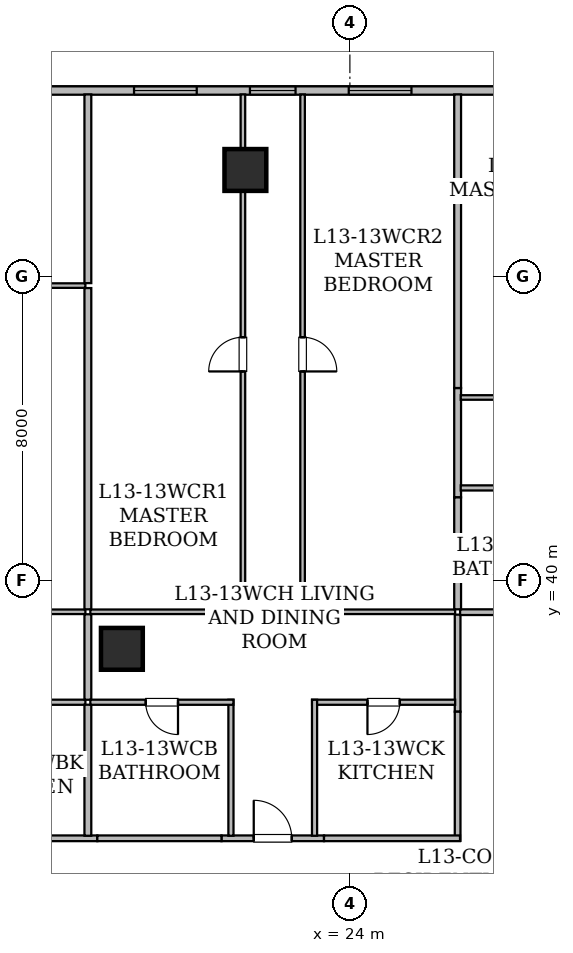
"""IFC4 building model, lengths in metres.
Left out: names, types, materials, properties, quantities, classifications, styles, units other than length and angle.
Written with IfcOpenShell. Run it as: python <this file> out.ifc"""

import sys

from ifc_helpers import new_model, si_unit, direction, frame, frame_2d, origin, origin_2d, place, context, subcontext, project, spatial, rectangle, hollow_rectangle, extrude, element, fill, save


model = new_model("IFC4")
c1 = context("Model", 3, precision=1e-05, world=origin(), true_north=direction((0.0, 1.0)))
c2 = subcontext(c1, "Body", "Model", "MODEL_VIEW")
j1 = project(units=[si_unit("LENGTHUNIT", "METRE"), si_unit("PLANEANGLEUNIT", "RADIAN")], contexts=[c1])
p1 = place(None, origin())
s1 = spatial("IfcSite", under=j1, at=p1, CompositionType="ELEMENT")
p2 = place(p1, origin())
s2 = spatial("IfcBuilding", under=s1, at=p2, CompositionType="ELEMENT")
p3 = place(p2, frame((0.0, 0.0, 55.2)))
s3 = spatial("IfcBuildingStorey", under=s2, at=p3, CompositionType="ELEMENT", Elevation=55.2)
for number, where, z_axis, x_axis in (
    (1, (21.25, 50.8, 0.0), (0.0, 0.0, 1.0), (1.0, 0.0, 0.0)),
    (2, (18.0, 38.2, 0.0), (0.0, 0.0, 1.0), (1.0, 0.0, 0.0)),
):
    element("IfcColumn", number, at=place(p3, frame(where, z_axis=z_axis, x_axis=x_axis)), inside=s3, PredefinedType="COLUMN", context=c2, shape_type="SweptSolid", body=[
        extrude(hollow_rectangle(XDim=1.1, YDim=1.1, WallThickness=0.055, at=origin_2d()), origin(), (0.0, 0.0, 1.0), 3.65),
    ])
p4 = place(p3, frame((8.315, 52.89, 0.0), z_axis=(0.0, 0.0, 1.0), x_axis=(1.0, 0.0, 0.0)))
e3 = element("IfcWall", 3, at=p4, inside=s3, PredefinedType="STANDARD", context=c2, shape_type="SweptSolid", body=[
    extrude(rectangle(XDim=37.439, YDim=0.22, at=frame_2d((18.719, 0.0))), origin(), (0.0, 0.0, 1.0), 3.43),
])
p5 = place(p4, frame((5.093, 0.0, 0.85)))
e4 = element("IfcOpeningElement", 4, at=p5, cuts=e3, PredefinedType="OPENING", context=c2, shape_type="SweptSolid", body=[
    extrude(rectangle(XDim=1.65, YDim=1.55, at=frame_2d((0.825, 0.775))), frame((0.0, 0.12, 0.0), z_axis=(0.0, -1.0, 0.0), x_axis=(1.0, 0.0, 0.0)), (0.0, 0.0, 1.0), 0.24),
])
p6 = place(p4, frame((13.055, 0.0, 0.8)))
e5 = element("IfcOpeningElement", 5, at=p6, cuts=e3, PredefinedType="OPENING", context=c2, shape_type="SweptSolid", body=[
    extrude(rectangle(XDim=1.2, YDim=1.5, at=frame_2d((0.6, 0.75))), frame((0.0, 0.12, 0.0), z_axis=(0.0, -1.0, 0.0), x_axis=(1.0, 0.0, 0.0)), (0.0, 0.0, 1.0), 0.24),
])
p7 = place(p4, frame((10.005, 0.0, 0.85)))
e6 = element("IfcOpeningElement", 6, at=p7, cuts=e3, PredefinedType="OPENING", context=c2, shape_type="SweptSolid", body=[
    extrude(rectangle(XDim=1.65, YDim=1.55, at=frame_2d((0.825, 0.775))), frame((0.0, 0.12, 0.0), z_axis=(0.0, -1.0, 0.0), x_axis=(1.0, 0.0, 0.0)), (0.0, 0.0, 1.0), 0.24),
])
p8 = place(p4, frame((15.655, 0.0, 0.85)))
e7 = element("IfcOpeningElement", 7, at=p8, cuts=e3, PredefinedType="OPENING", context=c2, shape_type="SweptSolid", body=[
    extrude(rectangle(XDim=1.65, YDim=1.55, at=frame_2d((0.825, 0.775))), frame((0.0, 0.12, 0.0), z_axis=(0.0, -1.0, 0.0), x_axis=(1.0, 0.0, 0.0)), (0.0, 0.0, 1.0), 0.24),
])
p9 = place(p4, frame((25.185, 0.0, 0.8)))
e8 = element("IfcOpeningElement", 8, at=p9, cuts=e3, PredefinedType="OPENING", context=c2, shape_type="SweptSolid", body=[
    extrude(rectangle(XDim=1.2, YDim=1.5, at=frame_2d((0.6, 0.75))), frame((0.0, 0.12, 0.0), z_axis=(0.0, -1.0, 0.0), x_axis=(1.0, 0.0, 0.0)), (0.0, 0.0, 1.0), 0.24),
])
p10 = place(p4, frame((20.935, 0.0, 0.85)))
e9 = element("IfcOpeningElement", 9, at=p10, cuts=e3, PredefinedType="OPENING", context=c2, shape_type="SweptSolid", body=[
    extrude(rectangle(XDim=1.65, YDim=1.55, at=frame_2d((0.825, 0.775))), frame((0.0, 0.12, 0.0), z_axis=(0.0, -1.0, 0.0), x_axis=(1.0, 0.0, 0.0)), (0.0, 0.0, 1.0), 0.24),
])
p11 = place(p4, frame((28.985, 0.0, 0.85)))
e10 = element("IfcOpeningElement", 10, at=p11, cuts=e3, PredefinedType="OPENING", context=c2, shape_type="SweptSolid", body=[
    extrude(rectangle(XDim=1.65, YDim=1.55, at=frame_2d((0.825, 0.775))), frame((0.0, 0.12, 0.0), z_axis=(0.0, -1.0, 0.0), x_axis=(1.0, 0.0, 0.0)), (0.0, 0.0, 1.0), 0.24),
])
p12 = place(p4, frame((33.49, 0.0, 0.85)))
e11 = element("IfcOpeningElement", 11, at=p12, cuts=e3, PredefinedType="OPENING", context=c2, shape_type="SweptSolid", body=[
    extrude(rectangle(XDim=1.65, YDim=1.55, at=frame_2d((0.825, 0.775))), frame((0.0, 0.12, 0.0), z_axis=(0.0, -1.0, 0.0), x_axis=(1.0, 0.0, 0.0)), (0.0, 0.0, 1.0), 0.24),
])
p13 = place(p4, frame((35.942, 0.0, 0.85)))
e12 = element("IfcOpeningElement", 12, at=p13, cuts=e3, PredefinedType="OPENING", context=c2, shape_type="SweptSolid", body=[
    extrude(rectangle(XDim=1.35, YDim=1.5, at=frame_2d((0.675, 0.75))), frame((0.0, 0.12, 0.0), z_axis=(0.0, -1.0, 0.0), x_axis=(1.0, 0.0, 0.0)), (0.0, 0.0, 1.0), 0.24),
])
p14 = place(p3, frame((11.924, 33.215, 0.0), z_axis=(0.0, 0.0, 1.0), x_axis=(1.0, 0.0, 0.0)))
e13 = element("IfcWall", 13, at=p14, inside=s3, PredefinedType="STANDARD", context=c2, shape_type="SweptSolid", body=[
    extrude(rectangle(XDim=5.43, YDim=0.15, at=frame_2d((2.715, 0.0))), origin(), (0.0, 0.0, 1.0), 3.43),
])
p15 = place(p3, frame((26.835, 36.546, 0.0), z_axis=(0.0, 0.0, 1.0), x_axis=(0.0, 1.0, 0.0)))
e14 = element("IfcWall", 14, at=p15, inside=s3, PredefinedType="STANDARD", context=c2, shape_type="SweptSolid", body=[
    extrude(rectangle(XDim=2.554, YDim=0.15, at=frame_2d((1.277, 0.0))), origin(), (0.0, 0.0, 1.0), 2.647),
])
p16 = place(p3, frame((20.621, 33.215, 0.0), z_axis=(0.0, 0.0, 1.0), x_axis=(1.0, 0.0, 0.0)))
e15 = element("IfcWall", 15, at=p16, inside=s3, PredefinedType="STANDARD", context=c2, shape_type="SweptSolid", body=[
    extrude(rectangle(XDim=2.698, YDim=0.15, at=frame_2d((1.349, 0.0))), origin(), (0.0, 0.0, 1.0), 3.43),
])
p17 = place(p16, frame((0.849, 0.0, 0.0)))
e16 = element("IfcOpeningElement", 16, at=p17, cuts=e15, PredefinedType="OPENING", context=c2, shape_type="SweptSolid", body=[
    extrude(rectangle(XDim=1.0, YDim=2.15, at=frame_2d((0.5, 1.075))), frame((0.0, 0.085, 0.0), z_axis=(0.0, -1.0, 0.0), x_axis=(1.0, 0.0, 0.0)), (0.0, 0.0, 1.0), 0.17),
])
p18 = place(p3, frame((17.354, 33.215, 0.0), z_axis=(0.0, 0.0, 1.0), x_axis=(1.0, 0.0, 0.0)))
e17 = element("IfcWall", 17, at=p18, inside=s3, PredefinedType="STANDARD", context=c2, shape_type="SweptSolid", body=[
    extrude(rectangle(XDim=3.267, YDim=0.15, at=frame_2d((1.634, 0.0))), origin(), (0.0, 0.0, 1.0), 2.647),
])
p19 = place(p3, frame((26.835, 33.15, 0.0), z_axis=(0.0, 0.0, 1.0), x_axis=(0.0, 1.0, 0.0)))
e18 = element("IfcWall", 18, at=p19, inside=s3, PredefinedType="STANDARD", context=c2, shape_type="SweptSolid", body=[
    extrude(rectangle(XDim=3.396, YDim=0.15, at=frame_2d((1.698, 0.0))), origin(), (0.0, 0.0, 1.0), 3.43),
])
p20 = place(p3, frame((23.319, 33.215, 0.0), z_axis=(0.0, 0.0, 1.0), x_axis=(1.0, 0.0, 0.0)))
e19 = element("IfcWall", 19, at=p20, inside=s3, PredefinedType="STANDARD", context=c2, shape_type="SweptSolid", body=[
    extrude(rectangle(XDim=3.579, YDim=0.15, at=frame_2d((1.79, 0.0))), origin(), (0.0, 0.0, 1.0), 3.43),
])
p21 = place(p3, frame((26.9, 39.165, 0.0), z_axis=(0.0, 0.0, 1.0), x_axis=(1.0, 0.0, 0.0)))
e20 = element("IfcWall", 20, at=p21, inside=s3, PredefinedType="STANDARD", context=c2, shape_type="SweptSolid", body=[
    extrude(rectangle(XDim=4.701, YDim=0.15, at=frame_2d((2.351, 0.0))), origin(), (0.0, 0.0, 1.0), 2.647),
])
p22 = place(p3, frame((17.04, 36.795, 0.0), z_axis=(0.0, 0.0, 1.0), x_axis=(-1.0, 0.0, 0.0)))
e21 = element("IfcWall", 21, at=p22, inside=s3, PredefinedType="PARTITIONING", context=c2, shape_type="SweptSolid", body=[
    extrude(rectangle(XDim=5.43, YDim=0.135, at=frame_2d((2.715, 0.0))), origin(), (0.0, 0.0, 1.0), 3.43),
])
p23 = place(p22, frame((2.29, 0.0, 0.0)))
e22 = element("IfcOpeningElement", 22, at=p23, cuts=e21, PredefinedType="OPENING", context=c2, shape_type="SweptSolid", body=[
    extrude(rectangle(XDim=0.85, YDim=2.1, at=frame_2d((0.425, 1.05))), frame((0.0, 0.077, 0.0), z_axis=(0.0, -1.0, 0.0), x_axis=(1.0, 0.0, 0.0)), (0.0, 0.0, 1.0), 0.155),
])
p24 = place(p3, frame((11.295, 39.175, 0.0), z_axis=(0.0, 0.0, 1.0), x_axis=(1.0, 0.0, 0.0)))
e23 = element("IfcWall", 23, at=p24, inside=s3, PredefinedType="PARTITIONING", context=c2, shape_type="SweptSolid", body=[
    extrude(rectangle(XDim=5.745, YDim=0.12, at=frame_2d((2.873, 0.0))), origin(), (0.0, 0.0, 1.0), 3.43),
])
p25 = place(p3, frame((17.105, 39.11, 0.0), z_axis=(0.0, 0.0, 1.0), x_axis=(0.0, -1.0, 0.0)))
e24 = element("IfcWall", 24, at=p25, inside=s3, PredefinedType="STANDARD", context=c2, shape_type="SweptSolid", body=[
    extrude(rectangle(XDim=2.25, YDim=0.18, at=frame_2d((1.125, 0.0))), origin(), (0.0, 0.0, 1.0), 2.647),
])
p26 = place(p3, frame((17.105, 36.73, 0.0), z_axis=(0.0, 0.0, 1.0), x_axis=(0.0, -1.0, 0.0)))
e25 = element("IfcWall", 25, at=p26, inside=s3, PredefinedType="STANDARD", context=c2, shape_type="SweptSolid", body=[
    extrude(rectangle(XDim=3.448, YDim=0.18, at=frame_2d((1.724, 0.0))), origin(), (0.0, 0.0, 1.0), 3.43),
])
p27 = place(p3, frame((11.414, 47.758, 0.0), z_axis=(0.0, 0.0, 1.0), x_axis=(1.0, 0.0, 0.0)))
e26 = element("IfcWall", 26, at=p27, inside=s3, PredefinedType="PARTITIONING", context=c2, shape_type="SweptSolid", body=[
    extrude(rectangle(XDim=5.626, YDim=0.12, at=frame_2d((2.813, 0.0))), origin(), (0.0, 0.0, 1.0), 2.647),
])
p28 = place(p3, frame((17.105, 47.693, 0.0), z_axis=(0.0, 0.0, 1.0), x_axis=(0.0, -1.0, 0.0)))
e27 = element("IfcWall", 27, at=p28, inside=s3, PredefinedType="STANDARD", context=c2, shape_type="SweptSolid", body=[
    extrude(rectangle(XDim=8.453, YDim=0.18, at=frame_2d((4.227, 0.0))), origin(), (0.0, 0.0, 1.0), 2.647),
])
p29 = place(p3, frame((17.105, 52.788, 0.0), z_axis=(0.0, 0.0, 1.0), x_axis=(0.0, -1.0, 0.0)))
e28 = element("IfcWall", 28, at=p29, inside=s3, PredefinedType="STANDARD", context=c2, shape_type="SweptSolid", body=[
    extrude(rectangle(XDim=4.965, YDim=0.18, at=frame_2d((2.482, 0.0))), origin(), (0.0, 0.0, 1.0), 2.803),
])
p30 = place(p3, frame((20.87, 33.282, 0.0), z_axis=(0.0, 0.0, 1.0), x_axis=(0.0, 1.0, 0.0)))
e29 = element("IfcWall", 29, at=p30, inside=s3, PredefinedType="PARTITIONING", context=c2, shape_type="SweptSolid", body=[
    extrude(rectangle(XDim=3.578, YDim=0.135, at=frame_2d((1.789, 0.0))), origin(), (0.0, 0.0, 1.0), 3.43),
])
p31 = place(p3, frame((20.935, 36.795, 0.0), z_axis=(0.0, 0.0, 1.0), x_axis=(-1.0, 0.0, 0.0)))
e30 = element("IfcWall", 30, at=p31, inside=s3, PredefinedType="PARTITIONING", context=c2, shape_type="SweptSolid", body=[
    extrude(rectangle(XDim=3.765, YDim=0.135, at=frame_2d((1.883, 0.0))), origin(), (0.0, 0.0, 1.0), 2.647),
])
p32 = place(p31, frame((1.458, 0.0, 0.0)))
e31 = element("IfcOpeningElement", 31, at=p32, cuts=e30, PredefinedType="OPENING", context=c2, shape_type="SweptSolid", body=[
    extrude(rectangle(XDim=0.85, YDim=2.1, at=frame_2d((0.425, 1.05))), frame((0.0, 0.077, 0.0), z_axis=(0.0, -1.0, 0.0), x_axis=(1.0, 0.0, 0.0)), (0.0, 0.0, 1.0), 0.155),
])
p33 = place(p3, frame((26.77, 36.795, 0.0), z_axis=(0.0, 0.0, 1.0), x_axis=(-1.0, 0.0, 0.0)))
e32 = element("IfcWall", 32, at=p33, inside=s3, PredefinedType="PARTITIONING", context=c2, shape_type="SweptSolid", body=[
    extrude(rectangle(XDim=3.765, YDim=0.135, at=frame_2d((1.883, 0.0))), origin(), (0.0, 0.0, 1.0), 3.43),
])
p34 = place(p33, frame((1.458, 0.0, 0.0)))
e33 = element("IfcOpeningElement", 33, at=p34, cuts=e32, PredefinedType="OPENING", context=c2, shape_type="SweptSolid", body=[
    extrude(rectangle(XDim=0.85, YDim=2.1, at=frame_2d((0.425, 1.05))), frame((0.0, 0.077, 0.0), z_axis=(0.0, -1.0, 0.0), x_axis=(1.0, 0.0, 0.0)), (0.0, 0.0, 1.0), 0.155),
])
p35 = place(p3, frame((23.07, 36.86, 0.0), z_axis=(0.0, 0.0, 1.0), x_axis=(0.0, -1.0, 0.0)))
e34 = element("IfcWall", 34, at=p35, inside=s3, PredefinedType="PARTITIONING", context=c2, shape_type="SweptSolid", body=[
    extrude(rectangle(XDim=3.578, YDim=0.135, at=frame_2d((1.789, 0.0))), origin(), (0.0, 0.0, 1.0), 3.43),
])
p36 = place(p3, frame((17.17, 39.175, 0.0), z_axis=(0.0, 0.0, 1.0), x_axis=(1.0, 0.0, 0.0)))
e35 = element("IfcWall", 35, at=p36, inside=s3, PredefinedType="PARTITIONING", context=c2, shape_type="SweptSolid", body=[
    extrude(rectangle(XDim=4.08, YDim=0.12, at=frame_2d((2.04, 0.0))), origin(), (0.0, 0.0, 1.0), 2.647),
])
p37 = place(p3, frame((21.185, 39.11, 0.0), z_axis=(0.0, 0.0, 1.0), x_axis=(0.0, 1.0, 0.0)))
e36 = element("IfcWall", 36, at=p37, inside=s3, PredefinedType="PARTITIONING", context=c2, shape_type="SweptSolid", body=[
    extrude(rectangle(XDim=13.678, YDim=0.12, at=frame_2d((6.839, 0.0))), origin(), (0.0, 0.0, 1.0), 2.647),
])
p38 = place(p37, frame((6.389, 0.0, 0.0)))
e37 = element("IfcOpeningElement", 37, at=p38, cuts=e36, PredefinedType="OPENING", context=c2, shape_type="SweptSolid", body=[
    extrude(rectangle(XDim=0.9, YDim=2.1, at=frame_2d((0.45, 1.05))), frame((0.0, 0.07, 0.0), z_axis=(0.0, -1.0, 0.0), x_axis=(1.0, 0.0, 0.0)), (0.0, 0.0, 1.0), 0.14),
])
p39 = place(p3, frame((22.755, 52.788, 0.0), z_axis=(0.0, 0.0, 1.0), x_axis=(0.0, -1.0, 0.0)))
e38 = element("IfcWall", 38, at=p39, inside=s3, PredefinedType="PARTITIONING", context=c2, shape_type="SweptSolid", body=[
    extrude(rectangle(XDim=13.678, YDim=0.12, at=frame_2d((6.839, 0.0))), origin(), (0.0, 0.0, 1.0), 2.803),
])
p40 = place(p39, frame((6.389, 0.0, 0.0)))
e39 = element("IfcOpeningElement", 39, at=p40, cuts=e38, PredefinedType="OPENING", context=c2, shape_type="SweptSolid", body=[
    extrude(rectangle(XDim=0.9, YDim=2.1, at=frame_2d((0.45, 1.05))), frame((0.0, 0.07, 0.0), z_axis=(0.0, -1.0, 0.0), x_axis=(1.0, 0.0, 0.0)), (0.0, 0.0, 1.0), 0.14),
])
p41 = place(p3, frame((22.69, 39.175, 0.0), z_axis=(0.0, 0.0, 1.0), x_axis=(1.0, 0.0, 0.0)))
e40 = element("IfcWall", 40, at=p41, inside=s3, PredefinedType="PARTITIONING", context=c2, shape_type="SweptSolid", body=[
    extrude(rectangle(XDim=4.08, YDim=0.12, at=frame_2d((2.04, 0.0))), origin(), (0.0, 0.0, 1.0), 3.43),
])
p42 = place(p3, frame((26.835, 45.063, 0.0), z_axis=(0.0, 0.0, 1.0), x_axis=(0.0, -1.0, 0.0)))
e41 = element("IfcWall", 41, at=p42, inside=s3, PredefinedType="STANDARD", context=c2, shape_type="SweptSolid", body=[
    extrude(rectangle(XDim=2.878, YDim=0.18, at=frame_2d((1.439, 0.0))), origin(), (0.0, 0.0, 1.0), 2.957),
])
p43 = place(p3, frame((26.835, 42.185, 0.0), z_axis=(0.0, 0.0, 1.0), x_axis=(0.0, -1.0, 0.0)))
e42 = element("IfcWall", 42, at=p43, inside=s3, PredefinedType="STANDARD", context=c2, shape_type="SweptSolid", body=[
    extrude(rectangle(XDim=2.945, YDim=0.18, at=frame_2d((1.473, 0.0))), origin(), (0.0, 0.0, 1.0), 3.43),
])
p44 = place(p3, frame((26.835, 52.788, 0.0), z_axis=(0.0, 0.0, 1.0), x_axis=(0.0, -1.0, 0.0)))
e43 = element("IfcWall", 43, at=p44, inside=s3, PredefinedType="STANDARD", context=c2, shape_type="SweptSolid", body=[
    extrude(rectangle(XDim=7.725, YDim=0.18, at=frame_2d((3.863, 0.0))), origin(), (0.0, 0.0, 1.0), 2.803),
])
p45 = place(p3, frame((31.915, 42.434, 0.0), z_axis=(0.0, 0.0, 1.0), x_axis=(-1.0, 0.0, 0.0)))
e44 = element("IfcWall", 44, at=p45, inside=s3, PredefinedType="PARTITIONING", context=c2, shape_type="SweptSolid", body=[
    extrude(rectangle(XDim=4.998, YDim=0.135, at=frame_2d((2.499, 0.0))), origin(), (0.0, 0.0, 1.0), 2.647),
])
p46 = place(p45, frame((2.074, 0.0, 0.0)))
e45 = element("IfcOpeningElement", 45, at=p46, cuts=e44, PredefinedType="OPENING", context=c2, shape_type="SweptSolid", body=[
    extrude(rectangle(XDim=0.85, YDim=2.1, at=frame_2d((0.425, 1.05))), frame((0.0, 0.077, 0.0), z_axis=(0.0, -1.0, 0.0), x_axis=(1.0, 0.0, 0.0)), (0.0, 0.0, 1.0), 0.155),
])
p47 = place(p3, frame((26.917, 44.814, 0.0), z_axis=(0.0, 0.0, 1.0), x_axis=(1.0, 0.0, 0.0)))
e46 = element("IfcWall", 46, at=p47, inside=s3, PredefinedType="PARTITIONING", context=c2, shape_type="SweptSolid", body=[
    extrude(rectangle(XDim=6.463, YDim=0.12, at=frame_2d((3.231, 0.0))), origin(), (0.0, 0.0, 1.0), 2.647),
])
p48 = place(p6, origin())
e47 = element("IfcWindow", 47, at=p48, inside=s3, PartitioningType="SINGLE_PANEL", PredefinedType="WINDOW", context=c2, shape_type="SweptSolid", body=[
    extrude(rectangle(XDim=1.2, YDim=1.5, at=frame_2d((0.6, 0.75))), frame((0.0, 0.03, 0.0), z_axis=(0.0, -1.0, 0.0), x_axis=(1.0, 0.0, 0.0)), (0.0, 0.0, 1.0), 0.06),
])
fill(e5, e47)
p49 = place(p7, origin())
e48 = element("IfcWindow", 48, at=p49, inside=s3, PartitioningType="SINGLE_PANEL", PredefinedType="WINDOW", context=c2, shape_type="SweptSolid", body=[
    extrude(rectangle(XDim=1.65, YDim=1.55, at=frame_2d((0.825, 0.775))), frame((0.0, 0.03, 0.0), z_axis=(0.0, -1.0, 0.0), x_axis=(1.0, 0.0, 0.0)), (0.0, 0.0, 1.0), 0.06),
])
fill(e6, e48)
p50 = place(p8, origin())
e49 = element("IfcWindow", 49, at=p50, inside=s3, PartitioningType="SINGLE_PANEL", PredefinedType="WINDOW", context=c2, shape_type="SweptSolid", body=[
    extrude(rectangle(XDim=1.65, YDim=1.55, at=frame_2d((0.825, 0.775))), frame((0.0, 0.03, 0.0), z_axis=(0.0, -1.0, 0.0), x_axis=(1.0, 0.0, 0.0)), (0.0, 0.0, 1.0), 0.06),
])
fill(e7, e49)
p51 = place(p17, origin())
e50 = element("IfcDoor", 50, at=p51, inside=s3, OperationType="SINGLE_SWING_LEFT", PredefinedType="DOOR", context=c2, shape_type="SweptSolid", body=[
    extrude(rectangle(XDim=1.0, YDim=2.15, at=frame_2d((0.5, 1.075))), frame((0.0, 0.025, 0.0), z_axis=(0.0, -1.0, 0.0), x_axis=(1.0, 0.0, 0.0)), (0.0, 0.0, 1.0), 0.05),
])
fill(e16, e50)
p52 = place(p32, origin())
e51 = element("IfcDoor", 51, at=p52, inside=s3, OperationType="SINGLE_SWING_LEFT", PredefinedType="DOOR", context=c2, shape_type="SweptSolid", body=[
    extrude(rectangle(XDim=0.85, YDim=2.1, at=frame_2d((0.425, 1.05))), frame((0.0, 0.025, 0.0), z_axis=(0.0, -1.0, 0.0), x_axis=(1.0, 0.0, 0.0)), (0.0, 0.0, 1.0), 0.05),
])
fill(e31, e51)
p53 = place(p34, origin())
e52 = element("IfcDoor", 52, at=p53, inside=s3, OperationType="SINGLE_SWING_RIGHT", PredefinedType="DOOR", context=c2, shape_type="SweptSolid", body=[
    extrude(rectangle(XDim=0.85, YDim=2.1, at=frame_2d((0.425, 1.05))), frame((0.0, 0.025, 0.0), z_axis=(0.0, -1.0, 0.0), x_axis=(1.0, 0.0, 0.0)), (0.0, 0.0, 1.0), 0.05),
])
fill(e33, e52)
p54 = place(p38, origin())
e53 = element("IfcDoor", 53, at=p54, inside=s3, OperationType="SINGLE_SWING_LEFT", PredefinedType="DOOR", context=c2, shape_type="SweptSolid", body=[
    extrude(rectangle(XDim=0.9, YDim=2.1, at=frame_2d((0.45, 1.05))), frame((0.0, 0.025, 0.0), z_axis=(0.0, -1.0, 0.0), x_axis=(1.0, 0.0, 0.0)), (0.0, 0.0, 1.0), 0.05),
])
fill(e37, e53)
p55 = place(p40, origin())
e54 = element("IfcDoor", 54, at=p55, inside=s3, OperationType="SINGLE_SWING_RIGHT", PredefinedType="DOOR", context=c2, shape_type="SweptSolid", body=[
    extrude(rectangle(XDim=0.9, YDim=2.1, at=frame_2d((0.45, 1.05))), frame((0.0, 0.025, 0.0), z_axis=(0.0, -1.0, 0.0), x_axis=(1.0, 0.0, 0.0)), (0.0, 0.0, 1.0), 0.05),
])
fill(e39, e54)
save(model, sys.argv[1])
